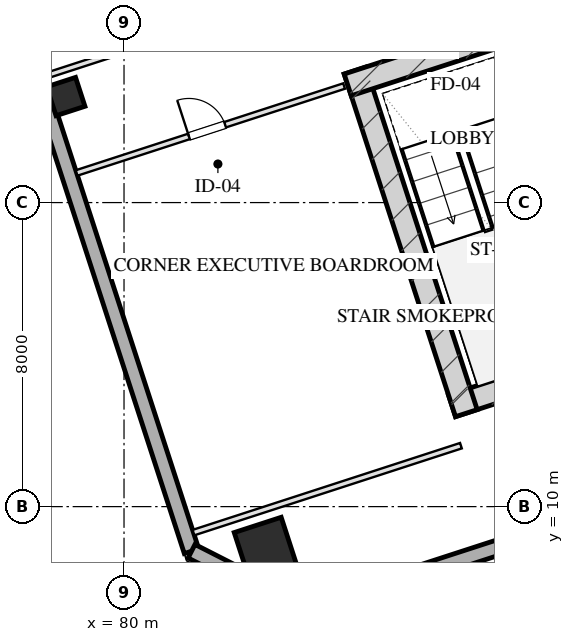
"""IFC4 building model, lengths in metres.
Left out: names, types, materials, properties, quantities, classifications, styles, units other than length and angle.
Written with IfcOpenShell. Run it as: python <this file> out.ifc"""

import sys

from ifc_helpers import new_model, si_unit, direction, frame, frame_2d, origin, origin_2d, place, context, subcontext, project, spatial, rectangle, hollow_rectangle, extrude, element, fill, save


model = new_model("IFC4")
c1 = context("Model", 3, precision=1e-05, world=origin(), true_north=direction((0.0, 1.0)))
c2 = subcontext(c1, "Body", "Model", "MODEL_VIEW")
j1 = project(units=[si_unit("LENGTHUNIT", "METRE"), si_unit("PLANEANGLEUNIT", "RADIAN")], contexts=[c1])
p1 = place(None, origin())
s1 = spatial("IfcSite", under=j1, at=p1, CompositionType="ELEMENT")
p2 = place(p1, origin())
s2 = spatial("IfcBuilding", under=s1, at=p2, CompositionType="ELEMENT")
p3 = place(p2, frame((0.0, 0.0, 166.75)))
s3 = spatial("IfcBuildingStorey", under=s2, at=p3, CompositionType="ELEMENT", Elevation=166.75)
p4 = place(p3, frame((88.63, 12.652, 0.0), z_axis=(0.0, 0.0, 1.0), x_axis=(0.95105714907, 0.309015046886, 0.0)))
e1 = element("IfcWall", 1, at=p4, inside=s3, PredefinedType="SHEAR", context=c2, shape_type="SweptSolid", body=[
    extrude(rectangle(XDim=16.4, YDim=0.6, at=frame_2d((8.2, 0.0))), origin(), (0.0, 0.0, 1.0), 3.45),
])
p5 = place(p3, frame((86.078, 21.475, 0.0), z_axis=(0.0, 0.0, 1.0), x_axis=(0.309017938678, -0.951056209472, 0.0)))
e2 = element("IfcWall", 2, at=p5, inside=s3, PredefinedType="SHEAR", context=c2, shape_type="SweptSolid", body=[
    extrude(rectangle(XDim=9.48, YDim=0.6, at=frame_2d((4.74, 0.0))), origin(), (0.0, 0.0, 1.0), 3.45),
])
p6 = place(p3, frame((85.886, 21.097, 0.0), z_axis=(0.0, 0.0, 1.0), x_axis=(0.951068073652, 0.308981422225, 0.0)))
e3 = element("IfcWall", 3, at=p6, inside=s3, PredefinedType="SHEAR", context=c2, shape_type="SweptSolid", body=[
    extrude(rectangle(XDim=4.22, YDim=0.6, at=frame_2d((2.11, 0.0))), origin(), (0.0, 0.0, 1.0), 3.45),
])
p7 = place(p3, frame((83.719, 8.901, 0.0), z_axis=(0.0, 0.0, 1.0), x_axis=(0.951056516295, 0.309016994375, 0.0)))
e4 = element("IfcColumn", 4, at=p7, inside=s3, PredefinedType="COLUMN", context=c2, shape_type="SweptSolid", body=[
    extrude(hollow_rectangle(XDim=1.3, YDim=1.3, WallThickness=0.045, at=origin_2d()), origin(), (0.0, 0.0, 1.0), 3.451),
])
p8 = place(p3, frame((78.468, 20.79, 0.0), z_axis=(0.0, 0.0, 1.0), x_axis=(0.951056516295, 0.309016994375, 0.0)))
e5 = element("IfcColumn", 5, at=p8, inside=s3, PredefinedType="COLUMN", context=c2, shape_type="SweptSolid", body=[
    extrude(hollow_rectangle(XDim=0.8, YDim=0.8, WallThickness=0.028, at=origin_2d()), origin(), (0.0, 0.0, 1.0), 3.451),
])
p9 = place(p3, frame((81.776, 8.827, 0.0), z_axis=(0.0, 0.0, 1.0), x_axis=(-0.309014228706, 0.951057414911, 0.0)))
e6 = element("IfcWall", 6, at=p9, inside=s3, PredefinedType="SOLIDWALL", context=c2, shape_type="SweptSolid", body=[
    extrude(rectangle(XDim=42.8, YDim=0.4, at=frame_2d((21.4, 0.0))), origin(), (0.0, 0.0, 1.0), 2.61),
])
p10 = place(p9, frame((17.75, 0.0, 0.0)))
e7 = element("IfcOpeningElement", 7, at=p10, cuts=e6, PredefinedType="OPENING", context=c2, shape_type="SweptSolid", body=[
    extrude(rectangle(XDim=1.1, YDim=2.15, at=frame_2d((0.55, 1.075))), frame((0.0, 0.21, 0.0), z_axis=(0.0, -1.0, 0.0), x_axis=(1.0, 0.0, 0.0)), (0.0, 0.0, 1.0), 0.42),
])
p11 = place(p3, frame((109.908, 15.444, 0.0), z_axis=(0.0, 0.0, 1.0), x_axis=(-0.951057580055, -0.30901372044, 0.0)))
e8 = element("IfcWall", 8, at=p11, inside=s3, PredefinedType="SOLIDWALL", context=c2, shape_type="SweptSolid", body=[
    extrude(rectangle(XDim=26.4, YDim=0.4, at=frame_2d((13.2, 0.0))), origin(), (0.0, 0.0, 1.0), 2.61),
])
p12 = place(p3, frame((84.801, 7.286, 0.0), z_axis=(0.0, 0.0, 1.0), x_axis=(-0.891020832027, 0.453962417932, 0.0)))
e9 = element("IfcWall", 9, at=p12, inside=s3, PredefinedType="SOLIDWALL", context=c2, shape_type="SweptSolid", body=[
    extrude(rectangle(XDim=3.394, YDim=0.4, at=frame_2d((1.697, 0.0))), origin(), (0.0, 0.0, 1.0), 2.61),
])
p13 = place(p3, frame((81.828, 9.316, 0.0), z_axis=(0.0, 0.0, 1.0), x_axis=(0.95105128112, 0.309033106124, 0.0)))
e10 = element("IfcWall", 10, at=p13, inside=s3, PredefinedType="PARTITIONING", context=c2, shape_type="SweptSolid", body=[
    extrude(rectangle(XDim=7.4, YDim=0.15, at=frame_2d((3.7, 0.0))), origin(), (0.0, 0.0, 1.0), 3.175),
])
p14 = place(p3, frame((78.753, 18.78, 0.0), z_axis=(0.0, 0.0, 1.0), x_axis=(0.951060977215, 0.309003264738, 0.0)))
e11 = element("IfcWall", 11, at=p14, inside=s3, PredefinedType="PARTITIONING", context=c2, shape_type="SweptSolid", body=[
    extrude(rectangle(XDim=7.4, YDim=0.15, at=frame_2d((3.7, 0.0))), origin(), (0.0, 0.0, 1.0), 3.175),
])
p15 = place(p14, frame((3.108, 0.0, 0.0)))
e12 = element("IfcOpeningElement", 12, at=p15, cuts=e11, PredefinedType="OPENING", context=c2, shape_type="SweptSolid", body=[
    extrude(rectangle(XDim=1.0, YDim=2.05, at=frame_2d((0.5, 1.025))), frame((0.0, 0.085, 0.0), z_axis=(0.0, -1.0, 0.0), x_axis=(1.0, 0.0, 0.0)), (0.0, 0.0, 1.0), 0.17),
])
p16 = place(p3, frame((77.925, 21.328, 0.0), z_axis=(0.0, 0.0, 1.0), x_axis=(0.951061887302, 0.309000463626, 0.0)))
e13 = element("IfcWall", 13, at=p16, inside=s3, PredefinedType="PARTITIONING", context=c2, shape_type="SweptSolid", body=[
    extrude(rectangle(XDim=6.9, YDim=0.15, at=frame_2d((3.45, 0.0))), origin(), (0.0, 0.0, 1.0), 3.175),
])
p17 = place(p15, origin())
e14 = element("IfcDoor", 14, at=p17, inside=s3, OperationType="SINGLE_SWING_LEFT", PredefinedType="DOOR", context=c2, shape_type="SweptSolid", body=[
    extrude(rectangle(XDim=1.0, YDim=2.05, at=frame_2d((0.5, 1.025))), frame((0.0, 0.025, 0.0), z_axis=(0.0, -1.0, 0.0), x_axis=(1.0, 0.0, 0.0)), (0.0, 0.0, 1.0), 0.05),
])
fill(e12, e14)
save(model, sys.argv[1])
